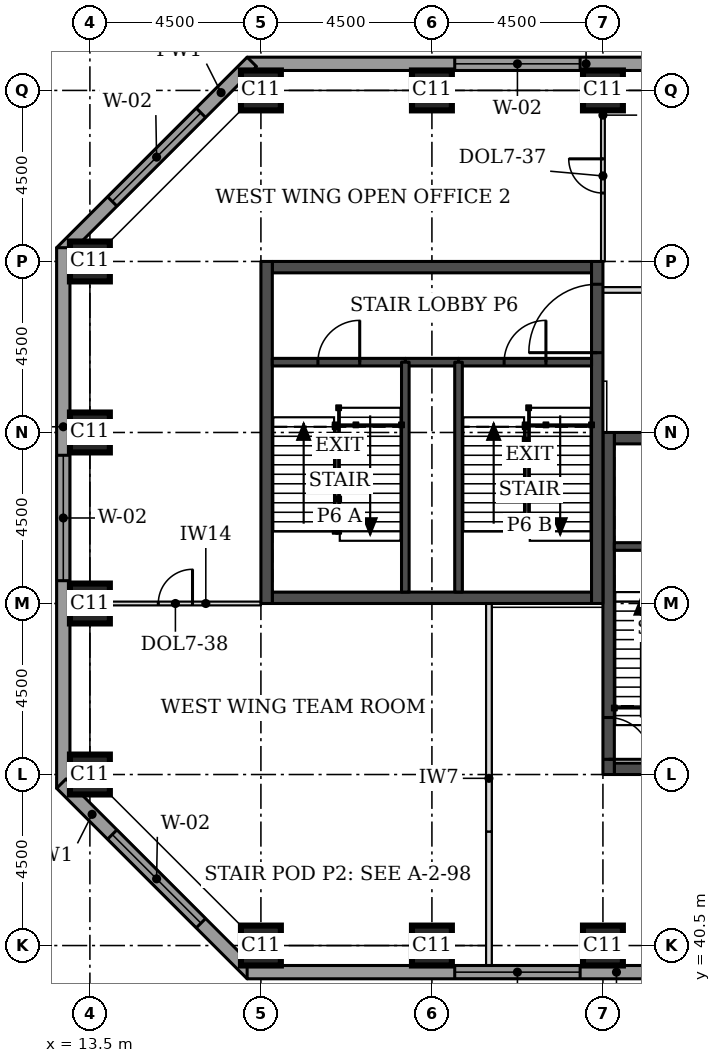
"""IFC4 building model, lengths in metres.
Left out: names, types, materials, properties, quantities, classifications, styles, units other than length and angle.
Written with IfcOpenShell. Run it as: python <this file> out.ifc"""

import sys

from ifc_helpers import new_model, si_unit, direction, frame, frame_2d, origin, origin_2d, place, context, subcontext, project, spatial, rectangle, extrude, element, fill, save


model = new_model("IFC4")
c1 = context("Model", 3, precision=1e-05, world=origin(), true_north=direction((0.0, 1.0)))
c2 = subcontext(c1, "Body", "Model", "MODEL_VIEW")
j1 = project(units=[si_unit("LENGTHUNIT", "METRE"), si_unit("PLANEANGLEUNIT", "RADIAN")], contexts=[c1])
p1 = place(None, origin())
s1 = spatial("IfcSite", under=j1, at=p1, CompositionType="ELEMENT")
p2 = place(p1, origin())
s2 = spatial("IfcBuilding", under=s1, at=p2, CompositionType="ELEMENT")
p3 = place(p2, frame((0.0, 0.0, 127.0)))
s3 = spatial("IfcBuildingStorey", under=s2, at=p3, CompositionType="ELEMENT", Elevation=127.0)
for number, where, z_axis, x_axis in (
    (1, (18.0, 40.5, 0.0), (0.0, 0.0, 1.0), (1.0, 0.0, 0.0)),
    (2, (22.5, 40.5, 0.0), (0.0, 0.0, 1.0), (1.0, 0.0, 0.0)),
    (3, (27.0, 40.5, 0.0), (0.0, 0.0, 1.0), (1.0, 0.0, 0.0)),
    (4, (13.5, 45.0, 0.0), (0.0, 0.0, 1.0), (1.0, 0.0, 0.0)),
    (5, (13.5, 49.5, 0.0), (0.0, 0.0, 1.0), (1.0, 0.0, 0.0)),
    (6, (13.5, 54.0, 0.0), (0.0, 0.0, 1.0), (1.0, 0.0, 0.0)),
    (7, (13.5, 58.5, 0.0), (0.0, 0.0, 1.0), (1.0, 0.0, 0.0)),
    (8, (18.0, 63.0, 0.0), (0.0, 0.0, 1.0), (1.0, 0.0, 0.0)),
    (9, (22.5, 63.0, 0.0), (0.0, 0.0, 1.0), (1.0, 0.0, 0.0)),
    (10, (27.0, 63.0, 0.0), (0.0, 0.0, 1.0), (1.0, 0.0, 0.0)),
):
    element("IfcColumn", number, at=place(p3, frame(where, z_axis=z_axis, x_axis=x_axis)), inside=s3, PredefinedType="COLUMN", context=c2, shape_type="SweptSolid", body=[
        extrude(rectangle(XDim=1.05, YDim=1.05, at=origin_2d()), origin(), (0.0, 0.0, 1.0), 3.7),
    ])
p4 = place(p3, frame((27.3, 45.15, 0.0), z_axis=(0.0, 0.0, 1.0), x_axis=(1.0, 0.0, 0.0)))
e11 = element("IfcWall", 11, at=p4, inside=s3, PredefinedType="SHEAR", context=c2, shape_type="SweptSolid", body=[
    extrude(rectangle(XDim=8.4, YDim=0.3, at=frame_2d((4.2, 0.0))), origin(), (0.0, 0.0, 1.0), 3.7),
])
p5 = place(p4, frame((5.2, 0.0, 0.0)))
e12 = element("IfcOpeningElement", 12, at=p5, cuts=e11, PredefinedType="OPENING", context=c2, shape_type="SweptSolid", body=[
    extrude(rectangle(XDim=1.0, YDim=2.1, at=frame_2d((0.5, 1.05))), frame((0.0, 0.16, 0.0), z_axis=(0.0, -1.0, 0.0), x_axis=(1.0, 0.0, 0.0)), (0.0, 0.0, 1.0), 0.32),
])
p6 = place(p3, frame((27.3, 53.85, 0.0), z_axis=(0.0, 0.0, 1.0), x_axis=(1.0, 0.0, 0.0)))
e13 = element("IfcWall", 13, at=p6, inside=s3, PredefinedType="SHEAR", context=c2, shape_type="SweptSolid", body=[
    extrude(rectangle(XDim=8.4, YDim=0.3, at=frame_2d((4.2, 0.0))), origin(), (0.0, 0.0, 1.0), 3.7),
])
p7 = place(p6, frame((6.4, 0.0, 0.0)))
e14 = element("IfcOpeningElement", 14, at=p7, cuts=e13, PredefinedType="OPENING", context=c2, shape_type="SweptSolid", body=[
    extrude(rectangle(XDim=1.1, YDim=2.1, at=frame_2d((0.55, 1.05))), frame((0.0, 0.16, 0.0), z_axis=(0.0, -1.0, 0.0), x_axis=(1.0, 0.0, 0.0)), (0.0, 0.0, 1.0), 0.32),
])
p8 = place(p3, frame((27.15, 45.0, 0.0), z_axis=(0.0, 0.0, 1.0), x_axis=(0.0, 1.0, 0.0)))
e15 = element("IfcWall", 15, at=p8, inside=s3, PredefinedType="SHEAR", context=c2, shape_type="SweptSolid", body=[
    extrude(rectangle(XDim=9.0, YDim=0.3, at=frame_2d((4.5, 0.0))), origin(), (0.0, 0.0, 1.0), 3.7),
])
p9 = place(p8, frame((0.4, 0.0, 0.0)))
e16 = element("IfcOpeningElement", 16, at=p9, cuts=e15, PredefinedType="OPENING", context=c2, shape_type="SweptSolid", body=[
    extrude(rectangle(XDim=1.1, YDim=2.1, at=frame_2d((0.55, 1.05))), frame((0.0, 0.16, 0.0), z_axis=(0.0, -1.0, 0.0), x_axis=(1.0, 0.0, 0.0)), (0.0, 0.0, 1.0), 0.32),
])
for number, where, z_axis, x_axis in (
    (17, (18.3, 49.65, 0.0), (0.0, 0.0, 1.0), (1.0, 0.0, 0.0)),
    (18, (18.3, 58.35, 0.0), (0.0, 0.0, 1.0), (1.0, 0.0, 0.0)),
):
    element("IfcWall", number, at=place(p3, frame(where, z_axis=z_axis, x_axis=x_axis)), inside=s3, PredefinedType="SHEAR", context=c2, shape_type="SweptSolid", body=[
        extrude(rectangle(XDim=8.4, YDim=0.3, at=frame_2d((4.2, 0.0))), origin(), (0.0, 0.0, 1.0), 3.7),
    ])
p10 = place(p3, frame((18.15, 49.5, 0.0), z_axis=(0.0, 0.0, 1.0), x_axis=(0.0, 1.0, 0.0)))
e19 = element("IfcWall", 19, at=p10, inside=s3, PredefinedType="SHEAR", context=c2, shape_type="SweptSolid", body=[
    extrude(rectangle(XDim=9.0, YDim=0.3, at=frame_2d((4.5, 0.0))), origin(), (0.0, 0.0, 1.0), 3.7),
])
p11 = place(p3, frame((26.85, 49.5, 0.0), z_axis=(0.0, 0.0, 1.0), x_axis=(0.0, 1.0, 0.0)))
e20 = element("IfcWall", 20, at=p11, inside=s3, PredefinedType="SHEAR", context=c2, shape_type="SweptSolid", body=[
    extrude(rectangle(XDim=9.0, YDim=0.3, at=frame_2d((4.5, 0.0))), origin(), (0.0, 0.0, 1.0), 3.7),
])
p12 = place(p11, frame((6.6, 0.0, 0.0)))
e21 = element("IfcOpeningElement", 21, at=p12, cuts=e20, PredefinedType="OPENING", context=c2, shape_type="SweptSolid", body=[
    extrude(rectangle(XDim=1.8, YDim=2.1, at=frame_2d((0.9, 1.05))), frame((0.0, 0.16, 0.0), z_axis=(0.0, -1.0, 0.0), x_axis=(1.0, 0.0, 0.0)), (0.0, 0.0, 1.0), 0.32),
])
p13 = place(p3, frame((35.475, 63.7, 0.0), z_axis=(0.0, 0.0, 1.0), x_axis=(-1.0, 0.0, 0.0)))
e22 = element("IfcWall", 22, at=p13, inside=s3, PredefinedType="STANDARD", context=c2, shape_type="SweptSolid", body=[
    extrude(rectangle(XDim=17.837, YDim=0.35, at=frame_2d((8.919, 0.0))), origin(), (0.0, 0.0, 1.0), 3.525),
])
p14 = place(p13, frame((0.5, 0.0, 0.9)))
e23 = element("IfcOpeningElement", 23, at=p14, cuts=e22, PredefinedType="OPENING", context=c2, shape_type="SweptSolid", body=[
    extrude(rectangle(XDim=3.3, YDim=1.9, at=frame_2d((1.65, 0.95))), frame((0.0, 0.185, 0.0), z_axis=(0.0, -1.0, 0.0), x_axis=(1.0, 0.0, 0.0)), (0.0, 0.0, 1.0), 0.37),
])
p15 = place(p13, frame((9.075, 0.0, 0.9)))
e24 = element("IfcOpeningElement", 24, at=p15, cuts=e22, PredefinedType="OPENING", context=c2, shape_type="SweptSolid", body=[
    extrude(rectangle(XDim=3.3, YDim=1.9, at=frame_2d((1.65, 0.95))), frame((0.0, 0.185, 0.0), z_axis=(0.0, -1.0, 0.0), x_axis=(1.0, 0.0, 0.0)), (0.0, 0.0, 1.0), 0.37),
])
p16 = place(p3, frame((17.761, 63.751, 0.0), z_axis=(0.0, 0.0, 1.0), x_axis=(-0.707106781187, -0.707106781187, 0.0)))
e25 = element("IfcWall", 25, at=p16, inside=s3, PredefinedType="STANDARD", context=c2, shape_type="SweptSolid", body=[
    extrude(rectangle(XDim=7.089, YDim=0.35, at=frame_2d((3.544, 0.0))), origin(), (0.0, 0.0, 1.0), 3.525),
])
p17 = place(p16, frame((1.894, 0.0, 0.9)))
e26 = element("IfcOpeningElement", 26, at=p17, cuts=e25, PredefinedType="OPENING", context=c2, shape_type="SweptSolid", body=[
    extrude(rectangle(XDim=3.3, YDim=1.9, at=frame_2d((1.65, 0.95))), frame((0.0, 0.185, 0.0), z_axis=(0.0, -1.0, 0.0), x_axis=(1.0, 0.0, 0.0)), (0.0, 0.0, 1.0), 0.37),
])
p18 = place(p3, frame((12.8, 58.862, 0.0), z_axis=(0.0, 0.0, 1.0), x_axis=(0.0, -1.0, 0.0)))
e27 = element("IfcWall", 27, at=p18, inside=s3, PredefinedType="STANDARD", context=c2, shape_type="SweptSolid", body=[
    extrude(rectangle(XDim=14.225, YDim=0.35, at=frame_2d((7.112, 0.0))), origin(), (0.0, 0.0, 1.0), 3.525),
])
p19 = place(p18, frame((5.462, 0.0, 0.9)))
e28 = element("IfcOpeningElement", 28, at=p19, cuts=e27, PredefinedType="OPENING", context=c2, shape_type="SweptSolid", body=[
    extrude(rectangle(XDim=3.3, YDim=1.9, at=frame_2d((1.65, 0.95))), frame((0.0, 0.185, 0.0), z_axis=(0.0, -1.0, 0.0), x_axis=(1.0, 0.0, 0.0)), (0.0, 0.0, 1.0), 0.37),
])
p20 = place(p3, frame((12.749, 44.761, 0.0), z_axis=(0.0, 0.0, 1.0), x_axis=(0.707106781187, -0.707106781187, 0.0)))
e29 = element("IfcWall", 29, at=p20, inside=s3, PredefinedType="STANDARD", context=c2, shape_type="SweptSolid", body=[
    extrude(rectangle(XDim=7.089, YDim=0.35, at=frame_2d((3.544, 0.0))), origin(), (0.0, 0.0, 1.0), 3.525),
])
p21 = place(p20, frame((1.894, 0.0, 0.9)))
e30 = element("IfcOpeningElement", 30, at=p21, cuts=e29, PredefinedType="OPENING", context=c2, shape_type="SweptSolid", body=[
    extrude(rectangle(XDim=3.3, YDim=1.9, at=frame_2d((1.65, 0.95))), frame((0.0, 0.185, 0.0), z_axis=(0.0, -1.0, 0.0), x_axis=(1.0, 0.0, 0.0)), (0.0, 0.0, 1.0), 0.37),
])
p22 = place(p3, frame((17.638, 39.8, 0.0), z_axis=(0.0, 0.0, 1.0), x_axis=(1.0, 0.0, 0.0)))
e31 = element("IfcWall", 31, at=p22, inside=s3, PredefinedType="STANDARD", context=c2, shape_type="SweptSolid", body=[
    extrude(rectangle(XDim=17.837, YDim=0.35, at=frame_2d((8.919, 0.0))), origin(), (0.0, 0.0, 1.0), 3.525),
])
p23 = place(p22, frame((5.462, 0.0, 0.9)))
e32 = element("IfcOpeningElement", 32, at=p23, cuts=e31, PredefinedType="OPENING", context=c2, shape_type="SweptSolid", body=[
    extrude(rectangle(XDim=3.3, YDim=1.9, at=frame_2d((1.65, 0.95))), frame((0.0, 0.185, 0.0), z_axis=(0.0, -1.0, 0.0), x_axis=(1.0, 0.0, 0.0)), (0.0, 0.0, 1.0), 0.37),
])
p24 = place(p22, frame((14.037, 0.0, 0.9)))
e33 = element("IfcOpeningElement", 33, at=p24, cuts=e31, PredefinedType="OPENING", context=c2, shape_type="SweptSolid", body=[
    extrude(rectangle(XDim=3.3, YDim=1.9, at=frame_2d((1.65, 0.95))), frame((0.0, 0.185, 0.0), z_axis=(0.0, -1.0, 0.0), x_axis=(1.0, 0.0, 0.0)), (0.0, 0.0, 1.0), 0.37),
])
p25 = place(p3, frame((24.0, 39.975, 0.0), z_axis=(0.0, 0.0, 1.0), x_axis=(0.0, 1.0, 0.0)))
e34 = element("IfcWall", 34, at=p25, inside=s3, PredefinedType="PARTITIONING", context=c2, shape_type="SweptSolid", body=[
    extrude(rectangle(XDim=3.525, YDim=0.15, at=frame_2d((1.762, 0.0))), origin(), (0.0, 0.0, 1.0), 3.55),
])
p26 = place(p3, frame((24.0, 43.5, 0.0), z_axis=(0.0, 0.0, 1.0), x_axis=(0.0, 1.0, 0.0)))
e35 = element("IfcWall", 35, at=p26, inside=s3, PredefinedType="PARTITIONING", context=c2, shape_type="SweptSolid", body=[
    extrude(rectangle(XDim=6.0, YDim=0.15, at=frame_2d((3.0, 0.0))), origin(), (0.0, 0.0, 1.0), 3.55),
])
p27 = place(p3, frame((27.0, 63.0, 0.0), z_axis=(0.0, 0.0, 1.0), x_axis=(0.0, -1.0, 0.0)))
e36 = element("IfcWall", 36, at=p27, inside=s3, PredefinedType="PARTITIONING", context=c2, shape_type="SweptSolid", body=[
    extrude(rectangle(XDim=4.5, YDim=0.1, at=frame_2d((2.25, 0.0))), origin(), (0.0, 0.0, 1.0), 3.55),
])
p28 = place(p27, frame((1.8, 0.0, 0.0)))
e37 = element("IfcOpeningElement", 37, at=p28, cuts=e36, PredefinedType="OPENING", context=c2, shape_type="SweptSolid", body=[
    extrude(rectangle(XDim=0.9, YDim=2.1, at=frame_2d((0.45, 1.05))), frame((0.0, 0.06, 0.0), z_axis=(0.0, -1.0, 0.0), x_axis=(1.0, 0.0, 0.0)), (0.0, 0.0, 1.0), 0.12),
])
p29 = place(p3, frame((13.5, 49.5, 0.0), z_axis=(0.0, 0.0, 1.0), x_axis=(1.0, 0.0, 0.0)))
e38 = element("IfcWall", 38, at=p29, inside=s3, PredefinedType="PARTITIONING", context=c2, shape_type="SweptSolid", body=[
    extrude(rectangle(XDim=4.5, YDim=0.1, at=frame_2d((2.25, 0.0))), origin(), (0.0, 0.0, 1.0), 3.55),
])
p30 = place(p29, frame((1.8, 0.0, 0.0)))
e39 = element("IfcOpeningElement", 39, at=p30, cuts=e38, PredefinedType="OPENING", context=c2, shape_type="SweptSolid", body=[
    extrude(rectangle(XDim=0.9, YDim=2.1, at=frame_2d((0.45, 1.05))), frame((0.0, 0.06, 0.0), z_axis=(0.0, -1.0, 0.0), x_axis=(1.0, 0.0, 0.0)), (0.0, 0.0, 1.0), 0.12),
])
p31 = place(p3, frame((27.0, 57.75, 0.0), z_axis=(0.0, 0.0, 1.0), x_axis=(1.0, 0.0, 0.0)))
e40 = element("IfcWall", 40, at=p31, inside=s3, PredefinedType="PARTITIONING", context=c2, shape_type="SweptSolid", body=[
    extrude(rectangle(XDim=2.4, YDim=0.15, at=frame_2d((1.2, 0.0))), origin(), (0.0, 0.0, 1.0), 3.55),
])
p32 = place(p3, frame((27.3, 51.0, 0.0), z_axis=(0.0, 0.0, 1.0), x_axis=(1.0, 0.0, 0.0)))
e41 = element("IfcWall", 41, at=p32, inside=s3, PredefinedType="SOLIDWALL", context=c2, shape_type="SweptSolid", body=[
    extrude(rectangle(XDim=3.0, YDim=0.2, at=frame_2d((1.5, 0.0))), origin(), (0.0, 0.0, 1.0), 3.55),
])
p33 = place(p3, frame((21.8, 55.85, 0.0), z_axis=(0.0, 0.0, 1.0), x_axis=(1.0, 0.0, 0.0)))
e42 = element("IfcWall", 42, at=p33, inside=s3, PredefinedType="SOLIDWALL", context=c2, shape_type="SweptSolid", body=[
    extrude(rectangle(XDim=1.4, YDim=0.2, at=frame_2d((0.7, 0.0))), origin(), (0.0, 0.0, 1.0), 3.55),
])
p34 = place(p3, frame((18.3, 55.85, 0.0), z_axis=(0.0, 0.0, 1.0), x_axis=(1.0, 0.0, 0.0)))
e43 = element("IfcWall", 43, at=p34, inside=s3, PredefinedType="SOLIDWALL", context=c2, shape_type="SweptSolid", body=[
    extrude(rectangle(XDim=3.5, YDim=0.2, at=frame_2d((1.75, 0.0))), origin(), (0.0, 0.0, 1.0), 3.55),
])
p35 = place(p34, frame((1.2, 0.0, 0.0)))
e44 = element("IfcOpeningElement", 44, at=p35, cuts=e43, PredefinedType="OPENING", context=c2, shape_type="SweptSolid", body=[
    extrude(rectangle(XDim=1.1, YDim=2.1, at=frame_2d((0.55, 1.05))), frame((0.0, 0.11, 0.0), z_axis=(0.0, -1.0, 0.0), x_axis=(1.0, 0.0, 0.0)), (0.0, 0.0, 1.0), 0.22),
])
p36 = place(p3, frame((23.2, 55.85, 0.0), z_axis=(0.0, 0.0, 1.0), x_axis=(1.0, 0.0, 0.0)))
e45 = element("IfcWall", 45, at=p36, inside=s3, PredefinedType="SOLIDWALL", context=c2, shape_type="SweptSolid", body=[
    extrude(rectangle(XDim=3.5, YDim=0.2, at=frame_2d((1.75, 0.0))), origin(), (0.0, 0.0, 1.0), 3.55),
])
p37 = place(p36, frame((1.2, 0.0, 0.0)))
e46 = element("IfcOpeningElement", 46, at=p37, cuts=e45, PredefinedType="OPENING", context=c2, shape_type="SweptSolid", body=[
    extrude(rectangle(XDim=1.1, YDim=2.1, at=frame_2d((0.55, 1.05))), frame((0.0, 0.11, 0.0), z_axis=(0.0, -1.0, 0.0), x_axis=(1.0, 0.0, 0.0)), (0.0, 0.0, 1.0), 0.22),
])
for number, where, z_axis, x_axis in (
    (47, (21.8, 49.8, 0.0), (0.0, 0.0, 1.0), (0.0, 1.0, 0.0)),
    (48, (23.2, 49.8, 0.0), (0.0, 0.0, 1.0), (0.0, 1.0, 0.0)),
):
    element("IfcWall", number, at=place(p3, frame(where, z_axis=z_axis, x_axis=x_axis)), inside=s3, PredefinedType="SOLIDWALL", context=c2, shape_type="SweptSolid", body=[
        extrude(rectangle(XDim=6.05, YDim=0.2, at=frame_2d((3.025, 0.0))), origin(), (0.0, 0.0, 1.0), 3.55),
    ])
p38 = place(p15, origin())
e49 = element("IfcWindow", 49, at=p38, inside=s3, PartitioningType="SINGLE_PANEL", PredefinedType="WINDOW", context=c2, shape_type="SweptSolid", body=[
    extrude(rectangle(XDim=3.3, YDim=1.9, at=frame_2d((1.65, 0.95))), frame((0.0, 0.085, 0.0), z_axis=(0.0, -1.0, 0.0), x_axis=(1.0, 0.0, 0.0)), (0.0, 0.0, 1.0), 0.06),
])
fill(e24, e49)
p39 = place(p17, origin())
e50 = element("IfcWindow", 50, at=p39, inside=s3, PartitioningType="SINGLE_PANEL", PredefinedType="WINDOW", context=c2, shape_type="SweptSolid", body=[
    extrude(rectangle(XDim=3.3, YDim=1.9, at=frame_2d((1.65, 0.95))), frame((0.0, 0.085, 0.0), z_axis=(0.0, -1.0, 0.0), x_axis=(1.0, 0.0, 0.0)), (0.0, 0.0, 1.0), 0.06),
])
fill(e26, e50)
p40 = place(p19, origin())
e51 = element("IfcWindow", 51, at=p40, inside=s3, PartitioningType="SINGLE_PANEL", PredefinedType="WINDOW", context=c2, shape_type="SweptSolid", body=[
    extrude(rectangle(XDim=3.3, YDim=1.9, at=frame_2d((1.65, 0.95))), frame((0.0, 0.085, 0.0), z_axis=(0.0, -1.0, 0.0), x_axis=(1.0, 0.0, 0.0)), (0.0, 0.0, 1.0), 0.06),
])
fill(e28, e51)
p41 = place(p21, origin())
e52 = element("IfcWindow", 52, at=p41, inside=s3, PartitioningType="SINGLE_PANEL", PredefinedType="WINDOW", context=c2, shape_type="SweptSolid", body=[
    extrude(rectangle(XDim=3.3, YDim=1.9, at=frame_2d((1.65, 0.95))), frame((0.0, 0.085, 0.0), z_axis=(0.0, -1.0, 0.0), x_axis=(1.0, 0.0, 0.0)), (0.0, 0.0, 1.0), 0.06),
])
fill(e30, e52)
p42 = place(p23, origin())
e53 = element("IfcWindow", 53, at=p42, inside=s3, PartitioningType="SINGLE_PANEL", PredefinedType="WINDOW", context=c2, shape_type="SweptSolid", body=[
    extrude(rectangle(XDim=3.3, YDim=1.9, at=frame_2d((1.65, 0.95))), frame((0.0, 0.085, 0.0), z_axis=(0.0, -1.0, 0.0), x_axis=(1.0, 0.0, 0.0)), (0.0, 0.0, 1.0), 0.06),
])
fill(e32, e53)
p43 = place(p28, frame((0.9, 0.0, 0.0), z_axis=(0.0, 0.0, 1.0), x_axis=(-1.0, 0.0, 0.0)))
e54 = element("IfcDoor", 54, at=p43, inside=s3, OperationType="SINGLE_SWING_RIGHT", PredefinedType="DOOR", context=c2, shape_type="SweptSolid", body=[
    extrude(rectangle(XDim=0.9, YDim=2.1, at=frame_2d((0.45, 1.05))), frame((0.0, 0.025, 0.0), z_axis=(0.0, -1.0, 0.0), x_axis=(1.0, 0.0, 0.0)), (0.0, 0.0, 1.0), 0.05),
])
fill(e37, e54)
p44 = place(p30, origin())
e55 = element("IfcDoor", 55, at=p44, inside=s3, OperationType="SINGLE_SWING_RIGHT", PredefinedType="DOOR", context=c2, shape_type="SweptSolid", body=[
    extrude(rectangle(XDim=0.9, YDim=2.1, at=frame_2d((0.45, 1.05))), frame((0.0, 0.025, 0.0), z_axis=(0.0, -1.0, 0.0), x_axis=(1.0, 0.0, 0.0)), (0.0, 0.0, 1.0), 0.05),
])
fill(e39, e55)
p45 = place(p9, frame((1.1, 0.0, 0.0), z_axis=(0.0, 0.0, 1.0), x_axis=(-1.0, 0.0, 0.0)))
e56 = element("IfcDoor", 56, at=p45, inside=s3, OperationType="SINGLE_SWING_RIGHT", PredefinedType="DOOR", context=c2, shape_type="SweptSolid", body=[
    extrude(rectangle(XDim=1.1, YDim=2.1, at=frame_2d((0.55, 1.05))), frame((0.0, 0.025, 0.0), z_axis=(0.0, -1.0, 0.0), x_axis=(1.0, 0.0, 0.0)), (0.0, 0.0, 1.0), 0.05),
])
fill(e16, e56)
p46 = place(p35, origin())
e57 = element("IfcDoor", 57, at=p46, inside=s3, OperationType="SINGLE_SWING_RIGHT", PredefinedType="DOOR", context=c2, shape_type="SweptSolid", body=[
    extrude(rectangle(XDim=1.1, YDim=2.1, at=frame_2d((0.55, 1.05))), frame((0.0, 0.025, 0.0), z_axis=(0.0, -1.0, 0.0), x_axis=(1.0, 0.0, 0.0)), (0.0, 0.0, 1.0), 0.05),
])
fill(e44, e57)
p47 = place(p37, origin())
e58 = element("IfcDoor", 58, at=p47, inside=s3, OperationType="SINGLE_SWING_RIGHT", PredefinedType="DOOR", context=c2, shape_type="SweptSolid", body=[
    extrude(rectangle(XDim=1.1, YDim=2.1, at=frame_2d((0.55, 1.05))), frame((0.0, 0.025, 0.0), z_axis=(0.0, -1.0, 0.0), x_axis=(1.0, 0.0, 0.0)), (0.0, 0.0, 1.0), 0.05),
])
fill(e46, e58)
p48 = place(p12, origin())
e59 = element("IfcDoor", 59, at=p48, inside=s3, OperationType="SINGLE_SWING_LEFT", PredefinedType="DOOR", context=c2, shape_type="SweptSolid", body=[
    extrude(rectangle(XDim=1.8, YDim=2.1, at=frame_2d((0.9, 1.05))), frame((0.0, 0.025, 0.0), z_axis=(0.0, -1.0, 0.0), x_axis=(1.0, 0.0, 0.0)), (0.0, 0.0, 1.0), 0.05),
])
fill(e21, e59)
save(model, sys.argv[1])
